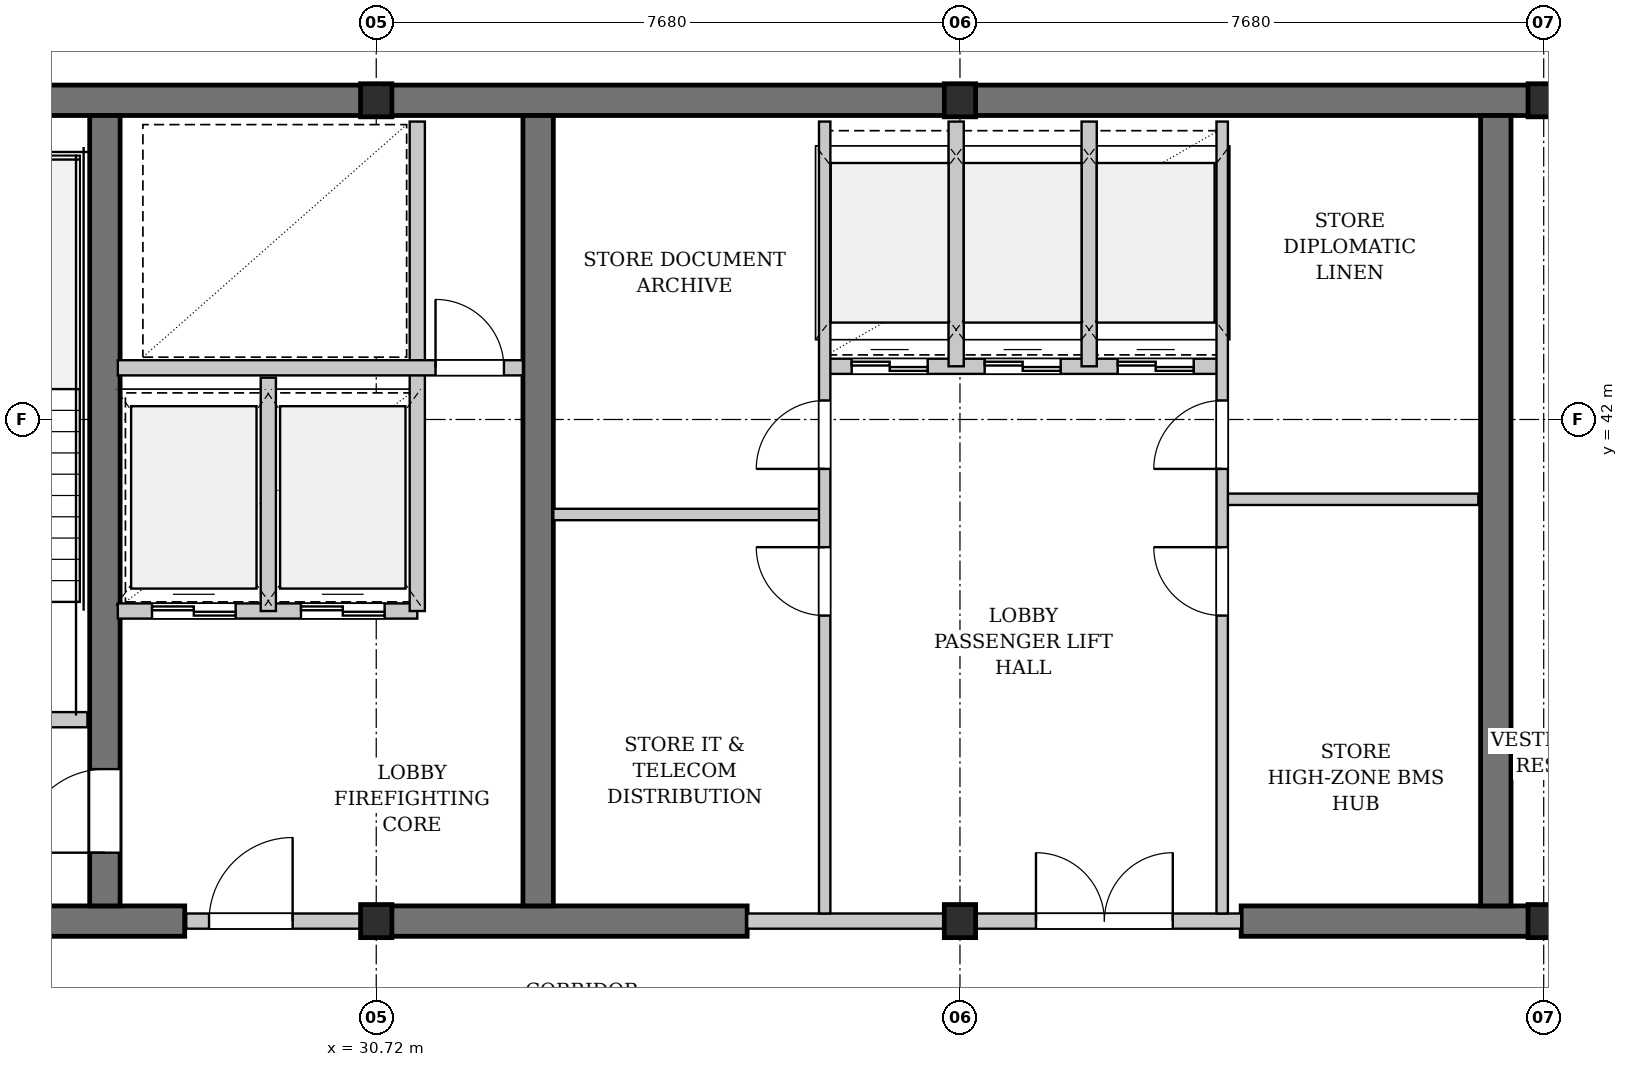
"""IFC4 building model, lengths in metres.
Left out: names, types, materials, properties, quantities, classifications, styles, units other than length and angle.
Written with IfcOpenShell. Run it as: python <this file> out.ifc"""

import sys

from ifc_helpers import new_model, si_unit, direction, frame, frame_2d, origin, origin_2d, place, context, subcontext, project, spatial, rectangle, i_section, extrude, element, fill, save


model = new_model("IFC4")
c1 = context("Model", 3, precision=1e-05, world=origin(), true_north=direction((0.0, 1.0)))
c2 = subcontext(c1, "Body", "Model", "MODEL_VIEW")
j1 = project(units=[si_unit("LENGTHUNIT", "METRE"), si_unit("PLANEANGLEUNIT", "RADIAN")], contexts=[c1])
p1 = place(None, origin())
s1 = spatial("IfcSite", under=j1, at=p1, CompositionType="ELEMENT")
p2 = place(p1, origin())
s2 = spatial("IfcBuilding", under=s1, at=p2, CompositionType="ELEMENT")
p3 = place(p2, frame((0.0, 0.0, 251.3)))
s3 = spatial("IfcBuildingStorey", under=s2, at=p3, CompositionType="ELEMENT", Elevation=251.3)
p4 = place(p3, frame((22.84, 46.2, 0.0), z_axis=(0.0, 0.0, 1.0), x_axis=(1.0, 0.0, 0.0)))
e1 = element("IfcWall", 1, at=p4, inside=s3, PredefinedType="SHEAR", context=c2, shape_type="SweptSolid", body=[
    extrude(rectangle(XDim=31.12, YDim=0.4, at=frame_2d((15.56, 0.0))), origin(), (0.0, 0.0, 1.0), 3.48),
])
p5 = place(p3, frame((22.84, 35.4, 0.0), z_axis=(0.0, 0.0, 1.0), x_axis=(1.0, 0.0, 0.0)))
e2 = element("IfcWall", 2, at=p5, inside=s3, PredefinedType="SHEAR", context=c2, shape_type="SweptSolid", body=[
    extrude(rectangle(XDim=5.36, YDim=0.4, at=frame_2d((2.68, 0.0))), origin(), (0.0, 0.0, 1.0), 3.48),
])
p6 = place(p3, frame((30.72, 35.4, 0.0), z_axis=(0.0, 0.0, 1.0), x_axis=(1.0, 0.0, 0.0)))
e3 = element("IfcWall", 3, at=p6, inside=s3, PredefinedType="SHEAR", context=c2, shape_type="SweptSolid", body=[
    extrude(rectangle(XDim=4.88, YDim=0.4, at=frame_2d((2.44, 0.0))), origin(), (0.0, 0.0, 1.0), 3.48),
])
p7 = place(p3, frame((42.1, 35.4, 0.0), z_axis=(0.0, 0.0, 1.0), x_axis=(1.0, 0.0, 0.0)))
e4 = element("IfcWall", 4, at=p7, inside=s3, PredefinedType="SHEAR", context=c2, shape_type="SweptSolid", body=[
    extrude(rectangle(XDim=8.05, YDim=0.4, at=frame_2d((4.025, 0.0))), origin(), (0.0, 0.0, 1.0), 3.48),
])
p8 = place(p7, frame((4.85, 0.0, 0.0)))
e5 = element("IfcOpeningElement", 5, at=p8, cuts=e4, PredefinedType="OPENING", context=c2, shape_type="SweptSolid", body=[
    extrude(rectangle(XDim=0.9, YDim=2.15, at=frame_2d((0.45, 1.075))), frame((0.0, 0.21, 0.0), z_axis=(0.0, -1.0, 0.0), x_axis=(1.0, 0.0, 0.0)), (0.0, 0.0, 1.0), 0.42),
])
p9 = place(p3, frame((27.15, 35.6, 0.0), z_axis=(0.0, 0.0, 1.0), x_axis=(0.0, 1.0, 0.0)))
e6 = element("IfcWall", 6, at=p9, inside=s3, PredefinedType="SHEAR", context=c2, shape_type="SweptSolid", body=[
    extrude(rectangle(XDim=10.4, YDim=0.4, at=frame_2d((5.2, 0.0))), origin(), (0.0, 0.0, 1.0), 3.48),
])
p10 = place(p9, frame((0.7, 0.0, 0.0)))
e7 = element("IfcOpeningElement", 7, at=p10, cuts=e6, PredefinedType="OPENING", context=c2, shape_type="SweptSolid", body=[
    extrude(rectangle(XDim=1.1, YDim=2.15, at=frame_2d((0.55, 1.075))), frame((0.0, 0.21, 0.0), z_axis=(0.0, -1.0, 0.0), x_axis=(1.0, 0.0, 0.0)), (0.0, 0.0, 1.0), 0.42),
])
for number, where, z_axis, x_axis in (
    (8, (32.85, 35.6, 0.0), (0.0, 0.0, 1.0), (0.0, 1.0, 0.0)),
    (9, (45.45, 35.6, 0.0), (0.0, 0.0, 1.0), (0.0, 1.0, 0.0)),
):
    element("IfcWall", number, at=place(p3, frame(where, z_axis=z_axis, x_axis=x_axis)), inside=s3, PredefinedType="SHEAR", context=c2, shape_type="SweptSolid", body=[
        extrude(rectangle(XDim=10.4, YDim=0.4, at=frame_2d((5.2, 0.0))), origin(), (0.0, 0.0, 1.0), 3.48),
    ])
for number, where, z_axis, x_axis in (
    (10, (30.72, 35.4, 0.0), (0.0, 0.0, 1.0), (1.0, 0.0, 0.0)),
    (11, (30.72, 46.2, 0.0), (0.0, 0.0, 1.0), (1.0, 0.0, 0.0)),
    (12, (38.4, 35.4, 0.0), (0.0, 0.0, 1.0), (1.0, 0.0, 0.0)),
    (13, (38.4, 46.2, 0.0), (0.0, 0.0, 1.0), (1.0, 0.0, 0.0)),
    (14, (46.08, 35.4, 0.0), (0.0, 0.0, 1.0), (1.0, 0.0, 0.0)),
    (15, (46.08, 46.2, 0.0), (0.0, 0.0, 1.0), (1.0, 0.0, 0.0)),
):
    element("IfcColumn", number, at=place(p3, frame(where, z_axis=z_axis, x_axis=x_axis)), inside=s3, PredefinedType="COLUMN", context=c2, shape_type="SweptSolid", body=[
        extrude(i_section(OverallWidth=0.412, OverallDepth=0.435, WebThickness=0.036, FlangeThickness=0.058, FilletRadius=0.015, at=origin_2d()), origin(), (0.0, 0.0, 1.0), 3.9),
    ])
p11 = place(p3, frame((23.3, 38.05, 0.0), z_axis=(0.0, 0.0, 1.0), x_axis=(1.0, 0.0, 0.0)))
e16 = element("IfcWall", 16, at=p11, inside=s3, PredefinedType="PARTITIONING", context=c2, shape_type="SweptSolid", body=[
    extrude(rectangle(XDim=3.62, YDim=0.2, at=frame_2d((1.81, 0.0))), origin(), (0.0, 0.0, 1.0), 3.48),
])
p12 = place(p11, frame((1.26, 0.0, 0.0)))
e17 = element("IfcOpeningElement", 17, at=p12, cuts=e16, PredefinedType="OPENING", context=c2, shape_type="SweptSolid", body=[
    extrude(rectangle(XDim=1.1, YDim=2.15, at=frame_2d((0.55, 1.075))), frame((0.0, 0.11, 0.0), z_axis=(0.0, -1.0, 0.0), x_axis=(1.0, 0.0, 0.0)), (0.0, 0.0, 1.0), 0.22),
])
p13 = place(p3, frame((28.22, 35.4, 0.0), z_axis=(0.0, 0.0, 1.0), x_axis=(1.0, 0.0, 0.0)))
e18 = element("IfcWall", 18, at=p13, inside=s3, PredefinedType="PARTITIONING", context=c2, shape_type="SweptSolid", body=[
    extrude(rectangle(XDim=2.5, YDim=0.2, at=frame_2d((1.25, 0.0))), origin(), (0.0, 0.0, 1.0), 2.661),
])
p14 = place(p13, frame((0.3, 0.0, 0.0)))
e19 = element("IfcOpeningElement", 19, at=p14, cuts=e18, PredefinedType="OPENING", context=c2, shape_type="SweptSolid", body=[
    extrude(rectangle(XDim=1.1, YDim=2.15, at=frame_2d((0.55, 1.075))), frame((0.0, 0.11, 0.0), z_axis=(0.0, -1.0, 0.0), x_axis=(1.0, 0.0, 0.0)), (0.0, 0.0, 1.0), 0.22),
])
p15 = place(p3, frame((27.32, 39.48, 0.0), z_axis=(0.0, 0.0, 1.0), x_axis=(1.0, 0.0, 0.0)))
e20 = element("IfcWall", 20, at=p15, inside=s3, PredefinedType="PARTITIONING", context=c2, shape_type="SweptSolid", body=[
    extrude(rectangle(XDim=3.94, YDim=0.2, at=frame_2d((1.97, 0.0))), origin(), (0.0, 0.0, 1.0), 3.48),
])
p16 = place(p15, frame((0.45, 0.0, 0.0)))
e21 = element("IfcOpeningElement", 21, at=p16, cuts=e20, PredefinedType="OPENING", context=c2, shape_type="SweptSolid", body=[
    extrude(rectangle(XDim=1.1, YDim=2.2, at=frame_2d((0.55, 1.1))), frame((0.0, 0.11, 0.0), z_axis=(0.0, -1.0, 0.0), x_axis=(1.0, 0.0, 0.0)), (0.0, 0.0, 1.0), 0.22),
])
p17 = place(p15, frame((2.41, 0.0, 0.0)))
e22 = element("IfcOpeningElement", 22, at=p17, cuts=e20, PredefinedType="OPENING", context=c2, shape_type="SweptSolid", body=[
    extrude(rectangle(XDim=1.1, YDim=2.2, at=frame_2d((0.55, 1.1))), frame((0.0, 0.11, 0.0), z_axis=(0.0, -1.0, 0.0), x_axis=(1.0, 0.0, 0.0)), (0.0, 0.0, 1.0), 0.22),
])
p18 = place(p3, frame((29.3, 39.48, 0.0), z_axis=(0.0, 0.0, 1.0), x_axis=(0.0, 1.0, 0.0)))
e23 = element("IfcWall", 23, at=p18, inside=s3, PredefinedType="PARTITIONING", context=c2, shape_type="SweptSolid", body=[
    extrude(rectangle(XDim=3.07, YDim=0.2, at=frame_2d((1.535, 0.0))), origin(), (0.0, 0.0, 1.0), 3.48),
])
p19 = place(p3, frame((31.26, 39.48, 0.0), z_axis=(0.0, 0.0, 1.0), x_axis=(0.0, 1.0, 0.0)))
e24 = element("IfcWall", 24, at=p19, inside=s3, PredefinedType="PARTITIONING", context=c2, shape_type="SweptSolid", body=[
    extrude(rectangle(XDim=6.44, YDim=0.2, at=frame_2d((3.22, 0.0))), origin(), (0.0, 0.0, 1.0), 3.48),
])
p20 = place(p3, frame((27.32, 42.68, 0.0), z_axis=(0.0, 0.0, 1.0), x_axis=(1.0, 0.0, 0.0)))
e25 = element("IfcWall", 25, at=p20, inside=s3, PredefinedType="PARTITIONING", context=c2, shape_type="SweptSolid", body=[
    extrude(rectangle(XDim=5.33, YDim=0.2, at=frame_2d((2.665, 0.0))), origin(), (0.0, 0.0, 1.0), 3.48),
])
p21 = place(p20, frame((4.18, 0.0, 0.0)))
e26 = element("IfcOpeningElement", 26, at=p21, cuts=e25, PredefinedType="OPENING", context=c2, shape_type="SweptSolid", body=[
    extrude(rectangle(XDim=0.9, YDim=2.15, at=frame_2d((0.45, 1.075))), frame((0.0, 0.11, 0.0), z_axis=(0.0, -1.0, 0.0), x_axis=(1.0, 0.0, 0.0)), (0.0, 0.0, 1.0), 0.22),
])
p22 = place(p3, frame((35.6, 35.4, 0.0), z_axis=(0.0, 0.0, 1.0), x_axis=(1.0, 0.0, 0.0)))
e27 = element("IfcWall", 27, at=p22, inside=s3, PredefinedType="PARTITIONING", context=c2, shape_type="SweptSolid", body=[
    extrude(rectangle(XDim=6.5, YDim=0.2, at=frame_2d((3.25, 0.0))), origin(), (0.0, 0.0, 1.0), 2.661),
])
p23 = place(p22, frame((3.8, 0.0, 0.0)))
e28 = element("IfcOpeningElement", 28, at=p23, cuts=e27, PredefinedType="OPENING", context=c2, shape_type="SweptSolid", body=[
    extrude(rectangle(XDim=1.8, YDim=2.3, at=frame_2d((0.9, 1.15))), frame((0.0, 0.11, 0.0), z_axis=(0.0, -1.0, 0.0), x_axis=(1.0, 0.0, 0.0)), (0.0, 0.0, 1.0), 0.22),
])
p24 = place(p3, frame((36.6, 42.7, 0.0), z_axis=(0.0, 0.0, 1.0), x_axis=(1.0, 0.0, 0.0)))
e29 = element("IfcWall", 29, at=p24, inside=s3, PredefinedType="PARTITIONING", context=c2, shape_type="SweptSolid", body=[
    extrude(rectangle(XDim=5.25, YDim=0.2, at=frame_2d((2.625, 0.0))), origin(), (0.0, 0.0, 1.0), 3.48),
])
p25 = place(p24, frame((0.375, 0.0, 0.0)))
e30 = element("IfcOpeningElement", 30, at=p25, cuts=e29, PredefinedType="OPENING", context=c2, shape_type="SweptSolid", body=[
    extrude(rectangle(XDim=1.0, YDim=2.2, at=frame_2d((0.5, 1.1))), frame((0.0, 0.11, 0.0), z_axis=(0.0, -1.0, 0.0), x_axis=(1.0, 0.0, 0.0)), (0.0, 0.0, 1.0), 0.22),
])
p26 = place(p24, frame((2.125, 0.0, 0.0)))
e31 = element("IfcOpeningElement", 31, at=p26, cuts=e29, PredefinedType="OPENING", context=c2, shape_type="SweptSolid", body=[
    extrude(rectangle(XDim=1.0, YDim=2.2, at=frame_2d((0.5, 1.1))), frame((0.0, 0.11, 0.0), z_axis=(0.0, -1.0, 0.0), x_axis=(1.0, 0.0, 0.0)), (0.0, 0.0, 1.0), 0.22),
])
p27 = place(p24, frame((3.875, 0.0, 0.0)))
e32 = element("IfcOpeningElement", 32, at=p27, cuts=e29, PredefinedType="OPENING", context=c2, shape_type="SweptSolid", body=[
    extrude(rectangle(XDim=1.0, YDim=2.2, at=frame_2d((0.5, 1.1))), frame((0.0, 0.11, 0.0), z_axis=(0.0, -1.0, 0.0), x_axis=(1.0, 0.0, 0.0)), (0.0, 0.0, 1.0), 0.22),
])
p28 = place(p3, frame((38.35, 42.7, 0.0), z_axis=(0.0, 0.0, 1.0), x_axis=(0.0, 1.0, 0.0)))
e33 = element("IfcWall", 33, at=p28, inside=s3, PredefinedType="PARTITIONING", context=c2, shape_type="SweptSolid", body=[
    extrude(rectangle(XDim=3.22, YDim=0.2, at=frame_2d((1.61, 0.0))), origin(), (0.0, 0.0, 1.0), 2.661),
])
p29 = place(p3, frame((40.1, 42.7, 0.0), z_axis=(0.0, 0.0, 1.0), x_axis=(0.0, 1.0, 0.0)))
e34 = element("IfcWall", 34, at=p29, inside=s3, PredefinedType="PARTITIONING", context=c2, shape_type="SweptSolid", body=[
    extrude(rectangle(XDim=3.22, YDim=0.2, at=frame_2d((1.61, 0.0))), origin(), (0.0, 0.0, 1.0), 3.48),
])
p30 = place(p3, frame((33.05, 40.75, 0.0), z_axis=(0.0, 0.0, 1.0), x_axis=(1.0, 0.0, 0.0)))
e35 = element("IfcWall", 35, at=p30, inside=s3, PredefinedType="PARTITIONING", context=c2, shape_type="SweptSolid", body=[
    extrude(rectangle(XDim=3.57, YDim=0.15, at=frame_2d((1.785, 0.0))), origin(), (0.0, 0.0, 1.0), 3.48),
])
p31 = place(p3, frame((36.62, 35.5, 0.0), z_axis=(0.0, 0.0, 1.0), x_axis=(0.0, 1.0, 0.0)))
e36 = element("IfcWall", 36, at=p31, inside=s3, PredefinedType="PARTITIONING", context=c2, shape_type="SweptSolid", body=[
    extrude(rectangle(XDim=10.42, YDim=0.15, at=frame_2d((5.21, 0.0))), origin(), (0.0, 0.0, 1.0), 3.48),
])
p32 = place(p31, frame((3.92, 0.0, 0.0)))
e37 = element("IfcOpeningElement", 37, at=p32, cuts=e36, PredefinedType="OPENING", context=c2, shape_type="SweptSolid", body=[
    extrude(rectangle(XDim=0.9, YDim=2.15, at=frame_2d((0.45, 1.075))), frame((0.0, 0.085, 0.0), z_axis=(0.0, -1.0, 0.0), x_axis=(1.0, 0.0, 0.0)), (0.0, 0.0, 1.0), 0.17),
])
p33 = place(p31, frame((5.85, 0.0, 0.0)))
e38 = element("IfcOpeningElement", 38, at=p33, cuts=e36, PredefinedType="OPENING", context=c2, shape_type="SweptSolid", body=[
    extrude(rectangle(XDim=0.9, YDim=2.15, at=frame_2d((0.45, 1.075))), frame((0.0, 0.085, 0.0), z_axis=(0.0, -1.0, 0.0), x_axis=(1.0, 0.0, 0.0)), (0.0, 0.0, 1.0), 0.17),
])
p34 = place(p3, frame((41.85, 40.95, 0.0), z_axis=(0.0, 0.0, 1.0), x_axis=(1.0, 0.0, 0.0)))
e39 = element("IfcWall", 39, at=p34, inside=s3, PredefinedType="PARTITIONING", context=c2, shape_type="SweptSolid", body=[
    extrude(rectangle(XDim=3.37, YDim=0.15, at=frame_2d((1.685, 0.0))), origin(), (0.0, 0.0, 1.0), 3.48),
])
p35 = place(p3, frame((41.85, 35.5, 0.0), z_axis=(0.0, 0.0, 1.0), x_axis=(0.0, 1.0, 0.0)))
e40 = element("IfcWall", 40, at=p35, inside=s3, PredefinedType="PARTITIONING", context=c2, shape_type="SweptSolid", body=[
    extrude(rectangle(XDim=10.42, YDim=0.15, at=frame_2d((5.21, 0.0))), origin(), (0.0, 0.0, 1.0), 3.48),
])
p36 = place(p35, frame((3.92, 0.0, 0.0)))
e41 = element("IfcOpeningElement", 41, at=p36, cuts=e40, PredefinedType="OPENING", context=c2, shape_type="SweptSolid", body=[
    extrude(rectangle(XDim=0.9, YDim=2.15, at=frame_2d((0.45, 1.075))), frame((0.0, 0.085, 0.0), z_axis=(0.0, -1.0, 0.0), x_axis=(1.0, 0.0, 0.0)), (0.0, 0.0, 1.0), 0.17),
])
p37 = place(p35, frame((5.85, 0.0, 0.0)))
e42 = element("IfcOpeningElement", 42, at=p37, cuts=e40, PredefinedType="OPENING", context=c2, shape_type="SweptSolid", body=[
    extrude(rectangle(XDim=0.9, YDim=2.15, at=frame_2d((0.45, 1.075))), frame((0.0, 0.085, 0.0), z_axis=(0.0, -1.0, 0.0), x_axis=(1.0, 0.0, 0.0)), (0.0, 0.0, 1.0), 0.17),
])
p38 = place(p14, origin())
e43 = element("IfcDoor", 43, at=p38, inside=s3, OperationType="SINGLE_SWING_RIGHT", PredefinedType="DOOR", context=c2, shape_type="SweptSolid", body=[
    extrude(rectangle(XDim=1.1, YDim=2.15, at=frame_2d((0.55, 1.075))), frame((0.0, 0.025, 0.0), z_axis=(0.0, -1.0, 0.0), x_axis=(1.0, 0.0, 0.0)), (0.0, 0.0, 1.0), 0.05),
])
fill(e19, e43)
p39 = place(p16, origin())
e44 = element("IfcDoor", 44, at=p39, inside=s3, OperationType="DOUBLE_DOOR_SLIDING", PredefinedType="DOOR", context=c2, shape_type="SweptSolid", body=[
    extrude(rectangle(XDim=1.1, YDim=2.2, at=frame_2d((0.55, 1.1))), frame((0.0, 0.025, 0.0), z_axis=(0.0, -1.0, 0.0), x_axis=(1.0, 0.0, 0.0)), (0.0, 0.0, 1.0), 0.05),
])
fill(e21, e44)
p40 = place(p17, origin())
e45 = element("IfcDoor", 45, at=p40, inside=s3, OperationType="DOUBLE_DOOR_SLIDING", PredefinedType="DOOR", context=c2, shape_type="SweptSolid", body=[
    extrude(rectangle(XDim=1.1, YDim=2.2, at=frame_2d((0.55, 1.1))), frame((0.0, 0.025, 0.0), z_axis=(0.0, -1.0, 0.0), x_axis=(1.0, 0.0, 0.0)), (0.0, 0.0, 1.0), 0.05),
])
fill(e22, e45)
p41 = place(p21, origin())
e46 = element("IfcDoor", 46, at=p41, inside=s3, OperationType="SINGLE_SWING_LEFT", PredefinedType="DOOR", context=c2, shape_type="SweptSolid", body=[
    extrude(rectangle(XDim=0.9, YDim=2.15, at=frame_2d((0.45, 1.075))), frame((0.0, 0.025, 0.0), z_axis=(0.0, -1.0, 0.0), x_axis=(1.0, 0.0, 0.0)), (0.0, 0.0, 1.0), 0.05),
])
fill(e26, e46)
p42 = place(p23, origin())
e47 = element("IfcDoor", 47, at=p42, inside=s3, OperationType="DOUBLE_DOOR_SINGLE_SWING", PredefinedType="DOOR", context=c2, shape_type="SweptSolid", body=[
    extrude(rectangle(XDim=1.8, YDim=2.3, at=frame_2d((0.9, 1.15))), frame((0.0, 0.025, 0.0), z_axis=(0.0, -1.0, 0.0), x_axis=(1.0, 0.0, 0.0)), (0.0, 0.0, 1.0), 0.05),
])
fill(e28, e47)
p43 = place(p25, origin())
e48 = element("IfcDoor", 48, at=p43, inside=s3, OperationType="DOUBLE_DOOR_SLIDING", PredefinedType="DOOR", context=c2, shape_type="SweptSolid", body=[
    extrude(rectangle(XDim=1.0, YDim=2.2, at=frame_2d((0.5, 1.1))), frame((0.0, 0.025, 0.0), z_axis=(0.0, -1.0, 0.0), x_axis=(1.0, 0.0, 0.0)), (0.0, 0.0, 1.0), 0.05),
])
fill(e30, e48)
p44 = place(p26, origin())
e49 = element("IfcDoor", 49, at=p44, inside=s3, OperationType="DOUBLE_DOOR_SLIDING", PredefinedType="DOOR", context=c2, shape_type="SweptSolid", body=[
    extrude(rectangle(XDim=1.0, YDim=2.2, at=frame_2d((0.5, 1.1))), frame((0.0, 0.025, 0.0), z_axis=(0.0, -1.0, 0.0), x_axis=(1.0, 0.0, 0.0)), (0.0, 0.0, 1.0), 0.05),
])
fill(e31, e49)
p45 = place(p27, origin())
e50 = element("IfcDoor", 50, at=p45, inside=s3, OperationType="DOUBLE_DOOR_SLIDING", PredefinedType="DOOR", context=c2, shape_type="SweptSolid", body=[
    extrude(rectangle(XDim=1.0, YDim=2.2, at=frame_2d((0.5, 1.1))), frame((0.0, 0.025, 0.0), z_axis=(0.0, -1.0, 0.0), x_axis=(1.0, 0.0, 0.0)), (0.0, 0.0, 1.0), 0.05),
])
fill(e32, e50)
p46 = place(p32, origin())
e51 = element("IfcDoor", 51, at=p46, inside=s3, OperationType="SINGLE_SWING_RIGHT", PredefinedType="DOOR", context=c2, shape_type="SweptSolid", body=[
    extrude(rectangle(XDim=0.9, YDim=2.15, at=frame_2d((0.45, 1.075))), frame((0.0, 0.025, 0.0), z_axis=(0.0, -1.0, 0.0), x_axis=(1.0, 0.0, 0.0)), (0.0, 0.0, 1.0), 0.05),
])
fill(e37, e51)
p47 = place(p33, origin())
e52 = element("IfcDoor", 52, at=p47, inside=s3, OperationType="SINGLE_SWING_LEFT", PredefinedType="DOOR", context=c2, shape_type="SweptSolid", body=[
    extrude(rectangle(XDim=0.9, YDim=2.15, at=frame_2d((0.45, 1.075))), frame((0.0, 0.025, 0.0), z_axis=(0.0, -1.0, 0.0), x_axis=(1.0, 0.0, 0.0)), (0.0, 0.0, 1.0), 0.05),
])
fill(e38, e52)
p48 = place(p36, origin())
e53 = element("IfcDoor", 53, at=p48, inside=s3, OperationType="SINGLE_SWING_RIGHT", PredefinedType="DOOR", context=c2, shape_type="SweptSolid", body=[
    extrude(rectangle(XDim=0.9, YDim=2.15, at=frame_2d((0.45, 1.075))), frame((0.0, 0.025, 0.0), z_axis=(0.0, -1.0, 0.0), x_axis=(1.0, 0.0, 0.0)), (0.0, 0.0, 1.0), 0.05),
])
fill(e41, e53)
p49 = place(p37, origin())
e54 = element("IfcDoor", 54, at=p49, inside=s3, OperationType="SINGLE_SWING_LEFT", PredefinedType="DOOR", context=c2, shape_type="SweptSolid", body=[
    extrude(rectangle(XDim=0.9, YDim=2.15, at=frame_2d((0.45, 1.075))), frame((0.0, 0.025, 0.0), z_axis=(0.0, -1.0, 0.0), x_axis=(1.0, 0.0, 0.0)), (0.0, 0.0, 1.0), 0.05),
])
fill(e42, e54)
p50 = place(p10, origin())
e55 = element("IfcDoor", 55, at=p50, inside=s3, OperationType="SINGLE_SWING_LEFT", PredefinedType="DOOR", context=c2, shape_type="SweptSolid", body=[
    extrude(rectangle(XDim=1.1, YDim=2.15, at=frame_2d((0.55, 1.075))), frame((0.0, 0.025, 0.0), z_axis=(0.0, -1.0, 0.0), x_axis=(1.0, 0.0, 0.0)), (0.0, 0.0, 1.0), 0.05),
])
fill(e7, e55)
save(model, sys.argv[1])
